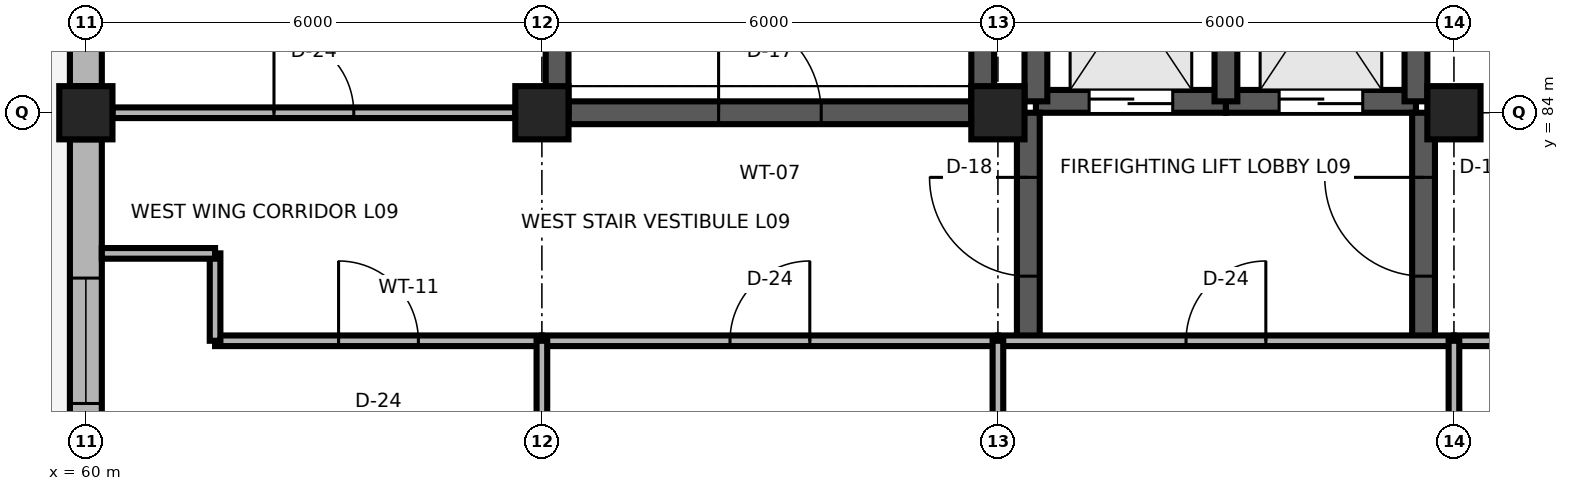
"""IFC4 building model, lengths in metres.
Left out: names, types, materials, properties, quantities, classifications, styles, units other than length and angle.
Written with IfcOpenShell. Run it as: python <this file> out.ifc"""

import sys

from ifc_helpers import new_model, si_unit, direction, frame, frame_2d, origin, origin_2d, place, context, subcontext, project, spatial, rectangle, extrude, element, fill, save


model = new_model("IFC4")
c1 = context("Model", 3, precision=1e-05, world=origin(), true_north=direction((0.0, 1.0)))
c2 = subcontext(c1, "Body", "Model", "MODEL_VIEW")
j1 = project(units=[si_unit("LENGTHUNIT", "METRE"), si_unit("PLANEANGLEUNIT", "RADIAN")], contexts=[c1])
p1 = place(None, origin())
s1 = spatial("IfcSite", under=j1, at=p1, CompositionType="ELEMENT")
p2 = place(p1, origin())
s2 = spatial("IfcBuilding", under=s1, at=p2, CompositionType="ELEMENT")
p3 = place(p2, frame((0.0, 0.0, 36.6)))
s3 = spatial("IfcBuildingStorey", under=s2, at=p3, CompositionType="ELEMENT", Elevation=36.6)
for number, where, z_axis, x_axis in (
    (1, (60.0, 84.0, 0.0), (0.0, 0.0, 1.0), (1.0, 0.0, 0.0)),
    (2, (66.0, 84.0, 0.0), (0.0, 0.0, 1.0), (1.0, 0.0, 0.0)),
    (3, (72.0, 84.0, 0.0), (0.0, 0.0, 1.0), (1.0, 0.0, 0.0)),
    (4, (78.0, 84.0, 0.0), (0.0, 0.0, 1.0), (1.0, 0.0, 0.0)),
):
    element("IfcColumn", number, at=place(p3, frame(where, z_axis=z_axis, x_axis=x_axis)), inside=s3, PredefinedType="COLUMN", context=c2, shape_type="SweptSolid", body=[
        extrude(rectangle(XDim=0.7, YDim=0.7, at=origin_2d()), origin(), (0.0, 0.0, 1.0), 3.9),
    ])
p4 = place(p3, frame((60.0, 78.35, 0.0), z_axis=(0.0, 0.0, 1.0), x_axis=(0.0, 1.0, 0.0)))
e5 = element("IfcWall", 5, at=p4, inside=s3, PredefinedType="SOLIDWALL", context=c2, shape_type="SweptSolid", body=[
    extrude(rectangle(XDim=5.3, YDim=0.42, at=frame_2d((2.65, 0.0))), origin(), (0.0, 0.0, 1.0), 3.32),
])
p5 = place(p4, frame((1.825, 0.0, 0.85)))
e6 = element("IfcOpeningElement", 6, at=p5, cuts=e5, PredefinedType="OPENING", context=c2, shape_type="SweptSolid", body=[
    extrude(rectangle(XDim=1.65, YDim=1.95, at=frame_2d((0.825, 0.975))), frame((0.0, 0.225, 0.0), z_axis=(0.0, -1.0, 0.0), x_axis=(1.0, 0.0, 0.0)), (0.0, 0.0, 1.0), 0.45),
])
p6 = place(p3, frame((60.0, 84.35, 0.0), z_axis=(0.0, 0.0, 1.0), x_axis=(0.0, 1.0, 0.0)))
e7 = element("IfcWall", 7, at=p6, inside=s3, PredefinedType="SOLIDWALL", context=c2, shape_type="SweptSolid", body=[
    extrude(rectangle(XDim=5.3, YDim=0.42, at=frame_2d((2.65, 0.0))), origin(), (0.0, 0.0, 1.0), 3.32),
])
p7 = place(p6, frame((1.825, 0.0, 0.85)))
e8 = element("IfcOpeningElement", 8, at=p7, cuts=e7, PredefinedType="OPENING", context=c2, shape_type="SweptSolid", body=[
    extrude(rectangle(XDim=1.65, YDim=1.95, at=frame_2d((0.825, 0.975))), frame((0.0, 0.225, 0.0), z_axis=(0.0, -1.0, 0.0), x_axis=(1.0, 0.0, 0.0)), (0.0, 0.0, 1.0), 0.45),
])
p8 = place(p3, frame((66.35, 84.0, 0.0), z_axis=(0.0, 0.0, 1.0), x_axis=(1.0, 0.0, 0.0)))
e9 = element("IfcWall", 9, at=p8, inside=s3, PredefinedType="SHEAR", context=c2, shape_type="SweptSolid", body=[
    extrude(rectangle(XDim=5.3, YDim=0.3, at=frame_2d((2.65, 0.0))), origin(), (0.0, 0.0, 1.0), 3.66),
])
p9 = place(p8, frame((1.975, 0.0, 0.0)))
e10 = element("IfcOpeningElement", 10, at=p9, cuts=e9, PredefinedType="OPENING", context=c2, shape_type="SweptSolid", body=[
    extrude(rectangle(XDim=1.35, YDim=2.2, at=frame_2d((0.675, 1.1))), frame((0.0, 0.165, 0.0), z_axis=(0.0, -1.0, 0.0), x_axis=(1.0, 0.0, 0.0)), (0.0, 0.0, 1.0), 0.33),
])
for number, where, z_axis, x_axis in (
    (11, (66.2, 84.0, 0.0), (0.0, 0.0, 1.0), (0.0, 1.0, 0.0)),
    (12, (71.8, 84.0, 0.0), (0.0, 0.0, 1.0), (0.0, 1.0, 0.0)),
):
    element("IfcWall", number, at=place(p3, frame(where, z_axis=z_axis, x_axis=x_axis)), inside=s3, PredefinedType="SHEAR", context=c2, shape_type="SweptSolid", body=[
        extrude(rectangle(XDim=11.8, YDim=0.3, at=frame_2d((5.9, 0.0))), origin(), (0.0, 0.0, 1.0), 3.74),
    ])
p10 = place(p3, frame((72.5, 84.15, 0.0), z_axis=(0.0, 0.0, 1.0), x_axis=(1.0, 0.0, 0.0)))
e13 = element("IfcWall", 13, at=p10, inside=s3, PredefinedType="SHEAR", context=c2, shape_type="SweptSolid", body=[
    extrude(rectangle(XDim=2.5, YDim=0.3, at=frame_2d((1.25, 0.0))), origin(), (0.0, 0.0, 1.0), 3.74),
])
p11 = place(p10, frame((0.7, 0.0, 0.0)))
e14 = element("IfcOpeningElement", 14, at=p11, cuts=e13, PredefinedType="OPENING", context=c2, shape_type="SweptSolid", body=[
    extrude(rectangle(XDim=1.1, YDim=2.1, at=frame_2d((0.55, 1.05))), frame((0.0, 0.165, 0.0), z_axis=(0.0, -1.0, 0.0), x_axis=(1.0, 0.0, 0.0)), (0.0, 0.0, 1.0), 0.33),
])
p12 = place(p3, frame((72.5, 84.15, 0.0), z_axis=(0.0, 0.0, 1.0), x_axis=(0.0, 1.0, 0.0)))
e15 = element("IfcWall", 15, at=p12, inside=s3, PredefinedType="SHEAR", context=c2, shape_type="SweptSolid", body=[
    extrude(rectangle(XDim=3.4, YDim=0.3, at=frame_2d((1.7, 0.0))), origin(), (0.0, 0.0, 1.0), 3.74),
])
p13 = place(p3, frame((75.0, 84.15, 0.0), z_axis=(0.0, 0.0, 1.0), x_axis=(1.0, 0.0, 0.0)))
e16 = element("IfcWall", 16, at=p13, inside=s3, PredefinedType="SHEAR", context=c2, shape_type="SweptSolid", body=[
    extrude(rectangle(XDim=2.5, YDim=0.3, at=frame_2d((1.25, 0.0))), origin(), (0.0, 0.0, 1.0), 3.74),
])
p14 = place(p13, frame((0.7, 0.0, 0.0)))
e17 = element("IfcOpeningElement", 17, at=p14, cuts=e16, PredefinedType="OPENING", context=c2, shape_type="SweptSolid", body=[
    extrude(rectangle(XDim=1.1, YDim=2.1, at=frame_2d((0.55, 1.05))), frame((0.0, 0.165, 0.0), z_axis=(0.0, -1.0, 0.0), x_axis=(1.0, 0.0, 0.0)), (0.0, 0.0, 1.0), 0.33),
])
for number, where, z_axis, x_axis in (
    (18, (75.0, 84.15, 0.0), (0.0, 0.0, 1.0), (0.0, 1.0, 0.0)),
    (19, (77.5, 84.15, 0.0), (0.0, 0.0, 1.0), (0.0, 1.0, 0.0)),
):
    element("IfcWall", number, at=place(p3, frame(where, z_axis=z_axis, x_axis=x_axis)), inside=s3, PredefinedType="SHEAR", context=c2, shape_type="SweptSolid", body=[
        extrude(rectangle(XDim=3.4, YDim=0.3, at=frame_2d((1.7, 0.0))), origin(), (0.0, 0.0, 1.0), 3.74),
    ])
p15 = place(p3, frame((72.4, 81.0, 0.0), z_axis=(0.0, 0.0, 1.0), x_axis=(0.0, 1.0, 0.0)))
e20 = element("IfcWall", 20, at=p15, inside=s3, PredefinedType="SHEAR", context=c2, shape_type="SweptSolid", body=[
    extrude(rectangle(XDim=3.0, YDim=0.3, at=frame_2d((1.5, 0.0))), origin(), (0.0, 0.0, 1.0), 3.74),
])
p16 = place(p15, frame((0.85, 0.0, 0.0)))
e21 = element("IfcOpeningElement", 21, at=p16, cuts=e20, PredefinedType="OPENING", context=c2, shape_type="SweptSolid", body=[
    extrude(rectangle(XDim=1.3, YDim=2.2, at=frame_2d((0.65, 1.1))), frame((0.0, 0.165, 0.0), z_axis=(0.0, -1.0, 0.0), x_axis=(1.0, 0.0, 0.0)), (0.0, 0.0, 1.0), 0.33),
])
p17 = place(p3, frame((77.6, 81.0, 0.0), z_axis=(0.0, 0.0, 1.0), x_axis=(0.0, 1.0, 0.0)))
e22 = element("IfcWall", 22, at=p17, inside=s3, PredefinedType="SHEAR", context=c2, shape_type="SweptSolid", body=[
    extrude(rectangle(XDim=3.0, YDim=0.3, at=frame_2d((1.5, 0.0))), origin(), (0.0, 0.0, 1.0), 3.74),
])
p18 = place(p17, frame((0.85, 0.0, 0.0)))
e23 = element("IfcOpeningElement", 23, at=p18, cuts=e22, PredefinedType="OPENING", context=c2, shape_type="SweptSolid", body=[
    extrude(rectangle(XDim=1.3, YDim=2.2, at=frame_2d((0.65, 1.1))), frame((0.0, 0.165, 0.0), z_axis=(0.0, -1.0, 0.0), x_axis=(1.0, 0.0, 0.0)), (0.0, 0.0, 1.0), 0.33),
])
p19 = place(p3, frame((61.7, 81.0, 0.0), z_axis=(0.0, 0.0, 1.0), x_axis=(1.0, 0.0, 0.0)))
e24 = element("IfcWall", 24, at=p19, inside=s3, PredefinedType="PARTITIONING", context=c2, shape_type="SweptSolid", body=[
    extrude(rectangle(XDim=4.3, YDim=0.14, at=frame_2d((2.15, 0.0))), origin(), (0.0, 0.0, 1.0), 3.74),
])
p20 = place(p19, frame((1.625, 0.0, 0.0)))
e25 = element("IfcOpeningElement", 25, at=p20, cuts=e24, PredefinedType="OPENING", context=c2, shape_type="SweptSolid", body=[
    extrude(rectangle(XDim=1.05, YDim=2.25, at=frame_2d((0.525, 1.125))), frame((0.0, 0.085, 0.0), z_axis=(0.0, -1.0, 0.0), x_axis=(1.0, 0.0, 0.0)), (0.0, 0.0, 1.0), 0.17),
])
p21 = place(p3, frame((66.0, 81.0, 0.0), z_axis=(0.0, 0.0, 1.0), x_axis=(1.0, 0.0, 0.0)))
e26 = element("IfcWall", 26, at=p21, inside=s3, PredefinedType="PARTITIONING", context=c2, shape_type="SweptSolid", body=[
    extrude(rectangle(XDim=6.0, YDim=0.14, at=frame_2d((3.0, 0.0))), origin(), (0.0, 0.0, 1.0), 3.74),
])
p22 = place(p21, frame((2.475, 0.0, 0.0)))
e27 = element("IfcOpeningElement", 27, at=p22, cuts=e26, PredefinedType="OPENING", context=c2, shape_type="SweptSolid", body=[
    extrude(rectangle(XDim=1.05, YDim=2.25, at=frame_2d((0.525, 1.125))), frame((0.0, 0.085, 0.0), z_axis=(0.0, -1.0, 0.0), x_axis=(1.0, 0.0, 0.0)), (0.0, 0.0, 1.0), 0.17),
])
p23 = place(p3, frame((72.0, 81.0, 0.0), z_axis=(0.0, 0.0, 1.0), x_axis=(1.0, 0.0, 0.0)))
e28 = element("IfcWall", 28, at=p23, inside=s3, PredefinedType="PARTITIONING", context=c2, shape_type="SweptSolid", body=[
    extrude(rectangle(XDim=6.0, YDim=0.14, at=frame_2d((3.0, 0.0))), origin(), (0.0, 0.0, 1.0), 3.74),
])
p24 = place(p23, frame((2.475, 0.0, 0.0)))
e29 = element("IfcOpeningElement", 29, at=p24, cuts=e28, PredefinedType="OPENING", context=c2, shape_type="SweptSolid", body=[
    extrude(rectangle(XDim=1.05, YDim=2.25, at=frame_2d((0.525, 1.125))), frame((0.0, 0.085, 0.0), z_axis=(0.0, -1.0, 0.0), x_axis=(1.0, 0.0, 0.0)), (0.0, 0.0, 1.0), 0.17),
])
p25 = place(p3, frame((78.0, 81.0, 0.0), z_axis=(0.0, 0.0, 1.0), x_axis=(1.0, 0.0, 0.0)))
e30 = element("IfcWall", 30, at=p25, inside=s3, PredefinedType="PARTITIONING", context=c2, shape_type="SweptSolid", body=[
    extrude(rectangle(XDim=6.0, YDim=0.14, at=frame_2d((3.0, 0.0))), origin(), (0.0, 0.0, 1.0), 3.74),
])
p26 = place(p25, frame((2.475, 0.0, 0.0)))
e31 = element("IfcOpeningElement", 31, at=p26, cuts=e30, PredefinedType="OPENING", context=c2, shape_type="SweptSolid", body=[
    extrude(rectangle(XDim=1.05, YDim=2.25, at=frame_2d((0.525, 1.125))), frame((0.0, 0.085, 0.0), z_axis=(0.0, -1.0, 0.0), x_axis=(1.0, 0.0, 0.0)), (0.0, 0.0, 1.0), 0.17),
])
p27 = place(p3, frame((60.35, 84.0, 0.0), z_axis=(0.0, 0.0, 1.0), x_axis=(1.0, 0.0, 0.0)))
e32 = element("IfcWall", 32, at=p27, inside=s3, PredefinedType="PARTITIONING", context=c2, shape_type="SweptSolid", body=[
    extrude(rectangle(XDim=5.3, YDim=0.14, at=frame_2d((2.65, 0.0))), origin(), (0.0, 0.0, 1.0), 3.348),
])
p28 = place(p27, frame((2.125, 0.0, 0.0)))
e33 = element("IfcOpeningElement", 33, at=p28, cuts=e32, PredefinedType="OPENING", context=c2, shape_type="SweptSolid", body=[
    extrude(rectangle(XDim=1.05, YDim=2.25, at=frame_2d((0.525, 1.125))), frame((0.0, 0.085, 0.0), z_axis=(0.0, -1.0, 0.0), x_axis=(1.0, 0.0, 0.0)), (0.0, 0.0, 1.0), 0.17),
])
for number, where, z_axis, x_axis in (
    (34, (66.0, 72.65, 0.0), (0.0, 0.0, 1.0), (0.0, 1.0, 0.0)),
    (35, (72.0, 72.65, 0.0), (0.0, 0.0, 1.0), (0.0, 1.0, 0.0)),
    (36, (78.0, 72.65, 0.0), (0.0, 0.0, 1.0), (0.0, 1.0, 0.0)),
):
    element("IfcWall", number, at=place(p3, frame(where, z_axis=z_axis, x_axis=x_axis)), inside=s3, PredefinedType="PARTITIONING", context=c2, shape_type="SweptSolid", body=[
        extrude(rectangle(XDim=8.35, YDim=0.14, at=frame_2d((4.175, 0.0))), origin(), (0.0, 0.0, 1.0), 3.348),
    ])
p29 = place(p3, frame((61.7, 81.0, 0.0), z_axis=(0.0, 0.0, 1.0), x_axis=(0.0, 1.0, 0.0)))
e37 = element("IfcWall", 37, at=p29, inside=s3, PredefinedType="PARTITIONING", context=c2, shape_type="SweptSolid", body=[
    extrude(rectangle(XDim=1.15, YDim=0.14, at=frame_2d((0.575, 0.0))), origin(), (0.0, 0.0, 1.0), 3.74),
])
p30 = place(p3, frame((61.7, 82.15, 0.0), z_axis=(0.0, 0.0, 1.0), x_axis=(-1.0, 0.0, 0.0)))
e38 = element("IfcWall", 38, at=p30, inside=s3, PredefinedType="PARTITIONING", context=c2, shape_type="SweptSolid", body=[
    extrude(rectangle(XDim=1.49, YDim=0.14, at=frame_2d((0.745, 0.0))), origin(), (0.0, 0.0, 1.0), 3.74),
])
p31 = place(p5, origin())
e39 = element("IfcWindow", 39, at=p31, inside=s3, PartitioningType="SINGLE_PANEL", PredefinedType="WINDOW", context=c2, shape_type="SweptSolid", body=[
    extrude(rectangle(XDim=1.65, YDim=1.95, at=frame_2d((0.825, 0.975))), frame((0.0, 0.03, 0.0), z_axis=(0.0, -1.0, 0.0), x_axis=(1.0, 0.0, 0.0)), (0.0, 0.0, 1.0), 0.06),
])
fill(e6, e39)
p32 = place(p9, origin())
e40 = element("IfcDoor", 40, at=p32, inside=s3, OperationType="SINGLE_SWING_LEFT", PredefinedType="DOOR", context=c2, shape_type="SweptSolid", body=[
    extrude(rectangle(XDim=1.35, YDim=2.2, at=frame_2d((0.675, 1.1))), frame((0.0, 0.025, 0.0), z_axis=(0.0, -1.0, 0.0), x_axis=(1.0, 0.0, 0.0)), (0.0, 0.0, 1.0), 0.05),
])
fill(e10, e40)
p33 = place(p11, origin())
e41 = element("IfcDoor", 41, at=p33, inside=s3, OperationType="DOUBLE_DOOR_SLIDING", PredefinedType="DOOR", context=c2, shape_type="SweptSolid", body=[
    extrude(rectangle(XDim=1.1, YDim=2.1, at=frame_2d((0.55, 1.05))), frame((0.0, 0.025, 0.0), z_axis=(0.0, -1.0, 0.0), x_axis=(1.0, 0.0, 0.0)), (0.0, 0.0, 1.0), 0.05),
])
fill(e14, e41)
p34 = place(p14, origin())
e42 = element("IfcDoor", 42, at=p34, inside=s3, OperationType="DOUBLE_DOOR_SLIDING", PredefinedType="DOOR", context=c2, shape_type="SweptSolid", body=[
    extrude(rectangle(XDim=1.1, YDim=2.1, at=frame_2d((0.55, 1.05))), frame((0.0, 0.025, 0.0), z_axis=(0.0, -1.0, 0.0), x_axis=(1.0, 0.0, 0.0)), (0.0, 0.0, 1.0), 0.05),
])
fill(e17, e42)
p35 = place(p16, origin())
e43 = element("IfcDoor", 43, at=p35, inside=s3, OperationType="SINGLE_SWING_RIGHT", PredefinedType="DOOR", context=c2, shape_type="SweptSolid", body=[
    extrude(rectangle(XDim=1.3, YDim=2.2, at=frame_2d((0.65, 1.1))), frame((0.0, 0.025, 0.0), z_axis=(0.0, -1.0, 0.0), x_axis=(1.0, 0.0, 0.0)), (0.0, 0.0, 1.0), 0.05),
])
fill(e21, e43)
p36 = place(p18, origin())
e44 = element("IfcDoor", 44, at=p36, inside=s3, OperationType="SINGLE_SWING_RIGHT", PredefinedType="DOOR", context=c2, shape_type="SweptSolid", body=[
    extrude(rectangle(XDim=1.3, YDim=2.2, at=frame_2d((0.65, 1.1))), frame((0.0, 0.025, 0.0), z_axis=(0.0, -1.0, 0.0), x_axis=(1.0, 0.0, 0.0)), (0.0, 0.0, 1.0), 0.05),
])
fill(e23, e44)
p37 = place(p20, origin())
e45 = element("IfcDoor", 45, at=p37, inside=s3, OperationType="SINGLE_SWING_LEFT", PredefinedType="DOOR", context=c2, shape_type="SweptSolid", body=[
    extrude(rectangle(XDim=1.05, YDim=2.25, at=frame_2d((0.525, 1.125))), frame((0.0, 0.025, 0.0), z_axis=(0.0, -1.0, 0.0), x_axis=(1.0, 0.0, 0.0)), (0.0, 0.0, 1.0), 0.05),
])
fill(e25, e45)
p38 = place(p22, origin())
e46 = element("IfcDoor", 46, at=p38, inside=s3, OperationType="SINGLE_SWING_RIGHT", PredefinedType="DOOR", context=c2, shape_type="SweptSolid", body=[
    extrude(rectangle(XDim=1.05, YDim=2.25, at=frame_2d((0.525, 1.125))), frame((0.0, 0.025, 0.0), z_axis=(0.0, -1.0, 0.0), x_axis=(1.0, 0.0, 0.0)), (0.0, 0.0, 1.0), 0.05),
])
fill(e27, e46)
p39 = place(p24, origin())
e47 = element("IfcDoor", 47, at=p39, inside=s3, OperationType="SINGLE_SWING_RIGHT", PredefinedType="DOOR", context=c2, shape_type="SweptSolid", body=[
    extrude(rectangle(XDim=1.05, YDim=2.25, at=frame_2d((0.525, 1.125))), frame((0.0, 0.025, 0.0), z_axis=(0.0, -1.0, 0.0), x_axis=(1.0, 0.0, 0.0)), (0.0, 0.0, 1.0), 0.05),
])
fill(e29, e47)
p40 = place(p28, origin())
e48 = element("IfcDoor", 48, at=p40, inside=s3, OperationType="SINGLE_SWING_LEFT", PredefinedType="DOOR", context=c2, shape_type="SweptSolid", body=[
    extrude(rectangle(XDim=1.05, YDim=2.25, at=frame_2d((0.525, 1.125))), frame((0.0, 0.025, 0.0), z_axis=(0.0, -1.0, 0.0), x_axis=(1.0, 0.0, 0.0)), (0.0, 0.0, 1.0), 0.05),
])
fill(e33, e48)
save(model, sys.argv[1])
